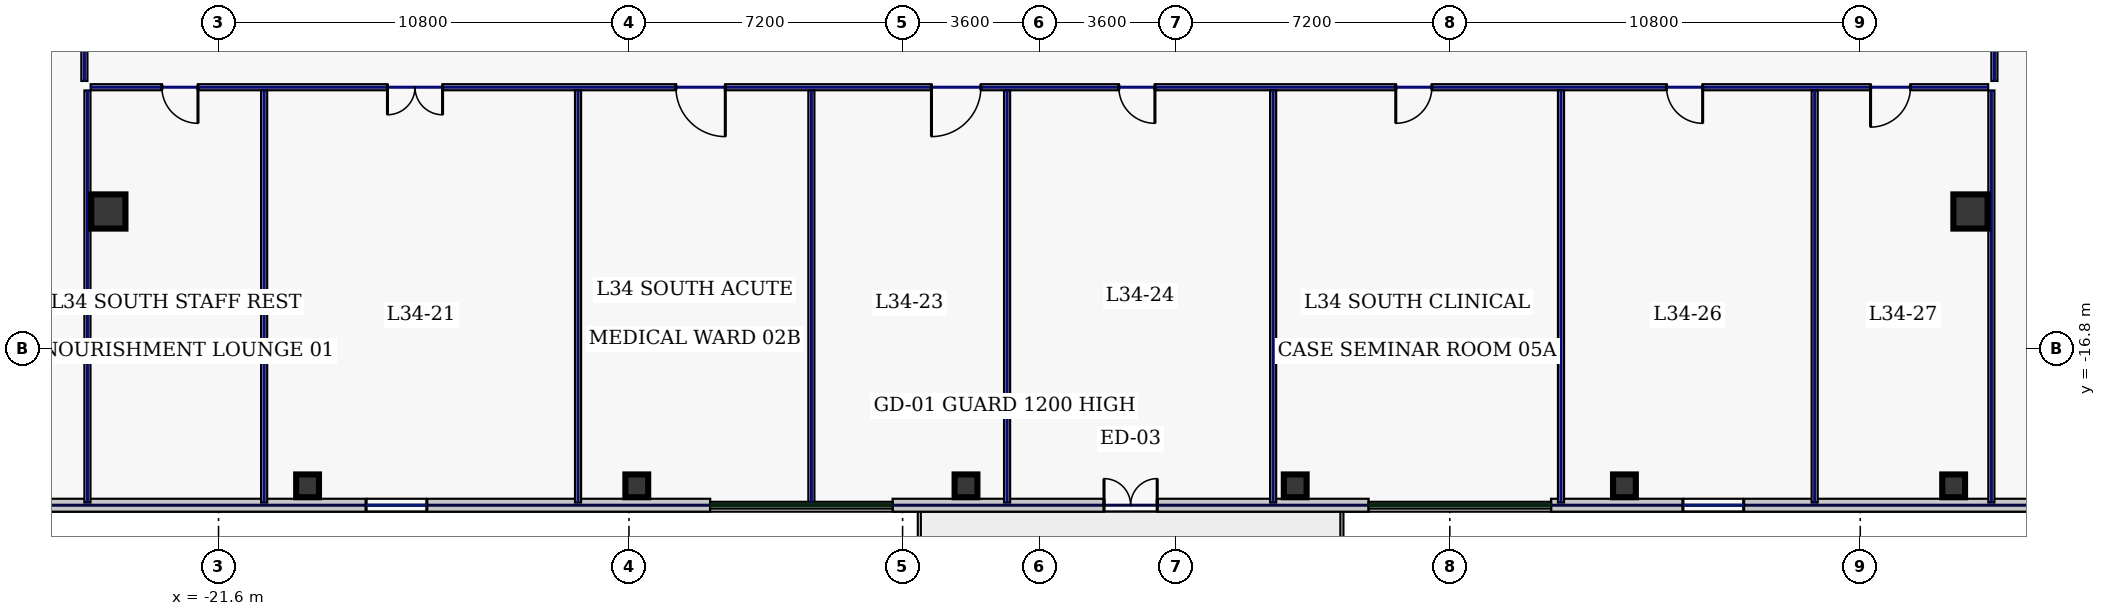
"""IFC4 building model, lengths in metres.
Left out: names, types, materials, properties, quantities, classifications, styles, units other than length and angle.
Written with IfcOpenShell. Run it as: python <this file> out.ifc"""

import sys

from ifc_helpers import new_model, si_unit, direction, frame, frame_2d, origin, origin_2d, place, context, subcontext, project, spatial, rectangle, hollow_rectangle, extrude, element, fill, save


model = new_model("IFC4")
c1 = context("Model", 3, precision=1e-05, world=origin(), true_north=direction((0.0, 1.0)))
c2 = subcontext(c1, "Body", "Model", "MODEL_VIEW")
j1 = project(units=[si_unit("LENGTHUNIT", "METRE"), si_unit("PLANEANGLEUNIT", "RADIAN")], contexts=[c1])
p1 = place(None, origin())
s1 = spatial("IfcSite", under=j1, at=p1, CompositionType="ELEMENT")
p2 = place(p1, origin())
s2 = spatial("IfcBuilding", under=s1, at=p2, CompositionType="ELEMENT")
p3 = place(p2, frame((0.0, 0.0, 152.2)))
s3 = spatial("IfcBuildingStorey", under=s2, at=p3, CompositionType="ELEMENT", Elevation=152.2)
for number, where, z_axis, x_axis in (
    (1, (-24.5, -13.2, 0.0), (0.0, 0.0, 1.0), (1.0, 0.0, 0.0)),
    (2, (24.5, -13.2, 0.0), (0.0, 0.0, 1.0), (1.0, 0.0, 0.0)),
):
    element("IfcColumn", number, at=place(p3, frame(where, z_axis=z_axis, x_axis=x_axis)), inside=s3, PredefinedType="COLUMN", context=c2, shape_type="SweptSolid", body=[
        extrude(hollow_rectangle(XDim=0.9, YDim=0.9, WallThickness=0.04, at=origin_2d()), origin(), (0.0, 0.0, 1.0), 3.74),
    ])
for number, where, z_axis, x_axis in (
    (3, (-19.257, -20.42, 0.0), (0.0, 0.0, 1.0), (1.0, 0.0, 0.0)),
    (4, (-10.594, -20.42, 0.0), (0.0, 0.0, 1.0), (1.0, 0.0, 0.0)),
    (5, (-1.931, -20.42, 0.0), (0.0, 0.0, 1.0), (1.0, 0.0, 0.0)),
    (6, (6.731, -20.42, 0.0), (0.0, 0.0, 1.0), (1.0, 0.0, 0.0)),
    (7, (15.394, -20.42, 0.0), (0.0, 0.0, 1.0), (1.0, 0.0, 0.0)),
    (8, (24.057, -20.42, 0.0), (0.0, 0.0, 1.0), (1.0, 0.0, 0.0)),
):
    element("IfcColumn", number, at=place(p3, frame(where, z_axis=z_axis, x_axis=x_axis)), inside=s3, PredefinedType="COLUMN", context=c2, shape_type="SweptSolid", body=[
        extrude(hollow_rectangle(XDim=0.6, YDim=0.6, WallThickness=0.028, at=origin_2d()), origin(), (0.0, 0.0, 1.0), 3.74),
    ])
p4 = place(p3, frame((-28.6, -20.93, 0.0), z_axis=(0.0, 0.0, 1.0), x_axis=(1.0, 0.0, 0.0)))
e9 = element("IfcWall", 9, at=p4, inside=s3, PredefinedType="STANDARD", context=c2, shape_type="SweptSolid", body=[
    extrude(rectangle(XDim=19.937, YDim=0.34, at=frame_2d((9.969, 0.0))), origin(), (0.0, 0.0, 1.0), 3.74),
])
p5 = place(p4, frame((10.882, 0.0, 0.22)))
e10 = element("IfcOpeningElement", 10, at=p5, cuts=e9, PredefinedType="OPENING", context=c2, shape_type="SweptSolid", body=[
    extrude(rectangle(XDim=1.6, YDim=1.2, at=frame_2d((0.8, 0.6))), frame((0.0, 0.18, 0.0), z_axis=(0.0, -1.0, 0.0), x_axis=(1.0, 0.0, 0.0)), (0.0, 0.0, 1.0), 0.36),
])
p6 = place(p3, frame((-3.863, -20.93, 0.0), z_axis=(0.0, 0.0, 1.0), x_axis=(1.0, 0.0, 0.0)))
e11 = element("IfcWall", 11, at=p6, inside=s3, PredefinedType="STANDARD", context=c2, shape_type="SweptSolid", body=[
    extrude(rectangle(XDim=12.526, YDim=0.34, at=frame_2d((6.263, 0.0))), origin(), (0.0, 0.0, 1.0), 3.74),
])
p7 = place(p6, frame((5.563, 0.0, 0.0)))
e12 = element("IfcOpeningElement", 12, at=p7, cuts=e11, PredefinedType="OPENING", context=c2, shape_type="SweptSolid", body=[
    extrude(rectangle(XDim=1.4, YDim=2.2, at=frame_2d((0.7, 1.1))), frame((0.0, 0.18, 0.0), z_axis=(0.0, -1.0, 0.0), x_axis=(1.0, 0.0, 0.0)), (0.0, 0.0, 1.0), 0.36),
])
p8 = place(p3, frame((13.463, -20.93, 0.0), z_axis=(0.0, 0.0, 1.0), x_axis=(1.0, 0.0, 0.0)))
e13 = element("IfcWall", 13, at=p8, inside=s3, PredefinedType="STANDARD", context=c2, shape_type="SweptSolid", body=[
    extrude(rectangle(XDim=19.937, YDim=0.34, at=frame_2d((9.969, 0.0))), origin(), (0.0, 0.0, 1.0), 3.74),
])
p9 = place(p8, frame((3.47, 0.0, 0.22)))
e14 = element("IfcOpeningElement", 14, at=p9, cuts=e13, PredefinedType="OPENING", context=c2, shape_type="SweptSolid", body=[
    extrude(rectangle(XDim=1.6, YDim=1.2, at=frame_2d((0.8, 0.6))), frame((0.0, 0.18, 0.0), z_axis=(0.0, -1.0, 0.0), x_axis=(1.0, 0.0, 0.0)), (0.0, 0.0, 1.0), 0.36),
])
p10 = place(p8, frame((16.118, 0.0, 0.22)))
e15 = element("IfcOpeningElement", 15, at=p10, cuts=e13, PredefinedType="OPENING", context=c2, shape_type="SweptSolid", body=[
    extrude(rectangle(XDim=1.6, YDim=1.2, at=frame_2d((0.8, 0.6))), frame((0.0, 0.18, 0.0), z_axis=(0.0, -1.0, 0.0), x_axis=(1.0, 0.0, 0.0)), (0.0, 0.0, 1.0), 0.36),
])
p11 = place(p3, frame((-25.13, -9.765, 0.0), z_axis=(0.0, 0.0, 1.0), x_axis=(0.0, 1.0, 0.0)))
e16 = element("IfcWall", 16, at=p11, inside=s3, PredefinedType="PARTITIONING", context=c2, shape_type="SweptSolid", body=[
    extrude(rectangle(XDim=2.98, YDim=0.16, at=frame_2d((1.49, 0.0))), origin(), (0.0, 0.0, 1.0), 3.74),
])
p12 = place(p11, frame((1.1, 0.0, 0.0)))
e17 = element("IfcOpeningElement", 17, at=p12, cuts=e16, PredefinedType="OPENING", context=c2, shape_type="SweptSolid", body=[
    extrude(rectangle(XDim=0.95, YDim=2.2, at=frame_2d((0.475, 1.1))), frame((0.0, 0.09, 0.0), z_axis=(0.0, -1.0, 0.0), x_axis=(1.0, 0.0, 0.0)), (0.0, 0.0, 1.0), 0.18),
])
p13 = place(p3, frame((25.13, -6.785, 0.0), z_axis=(0.0, 0.0, 1.0), x_axis=(0.0, -1.0, 0.0)))
e18 = element("IfcWall", 18, at=p13, inside=s3, PredefinedType="PARTITIONING", context=c2, shape_type="SweptSolid", body=[
    extrude(rectangle(XDim=2.98, YDim=0.16, at=frame_2d((1.49, 0.0))), origin(), (0.0, 0.0, 1.0), 3.74),
])
p14 = place(p13, frame((1.1, 0.0, 0.0)))
e19 = element("IfcOpeningElement", 19, at=p14, cuts=e18, PredefinedType="OPENING", context=c2, shape_type="SweptSolid", body=[
    extrude(rectangle(XDim=0.95, YDim=2.2, at=frame_2d((0.475, 1.1))), frame((0.0, 0.09, 0.0), z_axis=(0.0, -1.0, 0.0), x_axis=(1.0, 0.0, 0.0)), (0.0, 0.0, 1.0), 0.18),
])
p15 = place(p3, frame((24.965, -9.93, 0.0), z_axis=(0.0, 0.0, 1.0), x_axis=(-1.0, 0.0, 0.0)))
e20 = element("IfcWall", 20, at=p15, inside=s3, PredefinedType="PARTITIONING", context=c2, shape_type="SweptSolid", body=[
    extrude(rectangle(XDim=49.93, YDim=0.16, at=frame_2d((24.965, 0.0))), origin(), (0.0, 0.0, 1.0), 3.74),
])
p16 = place(p15, frame((47.106, 0.0, 0.0)))
e21 = element("IfcOpeningElement", 21, at=p16, cuts=e20, PredefinedType="OPENING", context=c2, shape_type="SweptSolid", body=[
    extrude(rectangle(XDim=0.95, YDim=2.2, at=frame_2d((0.475, 1.1))), frame((0.0, 0.09, 0.0), z_axis=(0.0, -1.0, 0.0), x_axis=(1.0, 0.0, 0.0)), (0.0, 0.0, 1.0), 0.18),
])
p17 = place(p15, frame((40.67, 0.0, 0.0)))
e22 = element("IfcOpeningElement", 22, at=p17, cuts=e20, PredefinedType="OPENING", context=c2, shape_type="SweptSolid", body=[
    extrude(rectangle(XDim=1.45, YDim=2.2, at=frame_2d((0.725, 1.1))), frame((0.0, 0.09, 0.0), z_axis=(0.0, -1.0, 0.0), x_axis=(1.0, 0.0, 0.0)), (0.0, 0.0, 1.0), 0.18),
])
p18 = place(p15, frame((33.23, 0.0, 0.0)))
e23 = element("IfcOpeningElement", 23, at=p18, cuts=e20, PredefinedType="OPENING", context=c2, shape_type="SweptSolid", body=[
    extrude(rectangle(XDim=1.3, YDim=2.2, at=frame_2d((0.65, 1.1))), frame((0.0, 0.09, 0.0), z_axis=(0.0, -1.0, 0.0), x_axis=(1.0, 0.0, 0.0)), (0.0, 0.0, 1.0), 0.18),
])
p19 = place(p15, frame((26.505, 0.0, 0.0)))
e24 = element("IfcOpeningElement", 24, at=p19, cuts=e20, PredefinedType="OPENING", context=c2, shape_type="SweptSolid", body=[
    extrude(rectangle(XDim=1.3, YDim=2.2, at=frame_2d((0.65, 1.1))), frame((0.0, 0.09, 0.0), z_axis=(0.0, -1.0, 0.0), x_axis=(1.0, 0.0, 0.0)), (0.0, 0.0, 1.0), 0.18),
])
p20 = place(p15, frame((21.925, 0.0, 0.0)))
e25 = element("IfcOpeningElement", 25, at=p20, cuts=e20, PredefinedType="OPENING", context=c2, shape_type="SweptSolid", body=[
    extrude(rectangle(XDim=0.95, YDim=2.2, at=frame_2d((0.475, 1.1))), frame((0.0, 0.09, 0.0), z_axis=(0.0, -1.0, 0.0), x_axis=(1.0, 0.0, 0.0)), (0.0, 0.0, 1.0), 0.18),
])
p21 = place(p15, frame((14.637, 0.0, 0.0)))
e26 = element("IfcOpeningElement", 26, at=p21, cuts=e20, PredefinedType="OPENING", context=c2, shape_type="SweptSolid", body=[
    extrude(rectangle(XDim=0.95, YDim=2.2, at=frame_2d((0.475, 1.1))), frame((0.0, 0.09, 0.0), z_axis=(0.0, -1.0, 0.0), x_axis=(1.0, 0.0, 0.0)), (0.0, 0.0, 1.0), 0.18),
])
p22 = place(p15, frame((7.512, 0.0, 0.0)))
e27 = element("IfcOpeningElement", 27, at=p22, cuts=e20, PredefinedType="OPENING", context=c2, shape_type="SweptSolid", body=[
    extrude(rectangle(XDim=0.95, YDim=2.2, at=frame_2d((0.475, 1.1))), frame((0.0, 0.09, 0.0), z_axis=(0.0, -1.0, 0.0), x_axis=(1.0, 0.0, 0.0)), (0.0, 0.0, 1.0), 0.18),
])
p23 = place(p15, frame((2.044, 0.0, 0.0)))
e28 = element("IfcOpeningElement", 28, at=p23, cuts=e20, PredefinedType="OPENING", context=c2, shape_type="SweptSolid", body=[
    extrude(rectangle(XDim=1.05, YDim=2.2, at=frame_2d((0.525, 1.1))), frame((0.0, 0.09, 0.0), z_axis=(0.0, -1.0, 0.0), x_axis=(1.0, 0.0, 0.0)), (0.0, 0.0, 1.0), 0.18),
])
for number, where, z_axis, x_axis in (
    (29, (-25.05, -20.86, 0.0), (0.0, 0.0, 1.0), (0.0, 1.0, 0.0)),
    (30, (25.05, -20.86, 0.0), (0.0, 0.0, 1.0), (0.0, 1.0, 0.0)),
    (31, (-20.4, -20.86, 0.0), (0.0, 0.0, 1.0), (0.0, 1.0, 0.0)),
    (32, (-6.0, -20.86, 0.0), (0.0, 0.0, 1.0), (0.0, 1.0, 0.0)),
    (33, (-0.85, -20.86, 0.0), (0.0, 0.0, 1.0), (0.0, 1.0, 0.0)),
):
    element("IfcWall", number, at=place(p3, frame(where, z_axis=z_axis, x_axis=x_axis)), inside=s3, PredefinedType="PARTITIONING", context=c2, shape_type="SweptSolid", body=[
        extrude(rectangle(XDim=10.845, YDim=0.16, at=frame_2d((5.423, 0.0))), origin(), (0.0, 0.0, 1.0), 3.74),
    ])
p24 = place(p3, frame((6.15, -20.86, 0.0), z_axis=(0.0, 0.0, 1.0), x_axis=(0.0, 1.0, 0.0)))
e34 = element("IfcWall", 34, at=p24, inside=s3, PredefinedType="PARTITIONING", context=c2, shape_type="SweptSolid", body=[
    extrude(rectangle(XDim=10.845, YDim=0.16, at=frame_2d((5.423, 0.0))), origin(), (0.0, 0.0, 1.0), 2.135),
])
p25 = place(p3, frame((20.4, -20.86, 0.0), z_axis=(0.0, 0.0, 1.0), x_axis=(0.0, 1.0, 0.0)))
e35 = element("IfcWall", 35, at=p25, inside=s3, PredefinedType="PARTITIONING", context=c2, shape_type="SweptSolid", body=[
    extrude(rectangle(XDim=10.845, YDim=0.16, at=frame_2d((5.423, 0.0))), origin(), (0.0, 0.0, 1.0), 3.74),
])
p26 = place(p3, frame((-12.14, -20.86, 0.0), z_axis=(0.0, 0.0, 1.0), x_axis=(0.0, 1.0, 0.0)))
e36 = element("IfcWall", 36, at=p26, inside=s3, PredefinedType="PARTITIONING", context=c2, shape_type="SweptSolid", body=[
    extrude(rectangle(XDim=10.845, YDim=0.16, at=frame_2d((5.423, 0.0))), origin(), (0.0, 0.0, 1.0), 1.535),
])
p27 = place(p3, frame((13.725, -20.86, 0.0), z_axis=(0.0, 0.0, 1.0), x_axis=(0.0, 1.0, 0.0)))
e37 = element("IfcWall", 37, at=p27, inside=s3, PredefinedType="PARTITIONING", context=c2, shape_type="SweptSolid", body=[
    extrude(rectangle(XDim=10.845, YDim=0.16, at=frame_2d((5.423, 0.0))), origin(), (0.0, 0.0, 1.0), 3.74),
])
p28 = place(p5, origin())
e38 = element("IfcWindow", 38, at=p28, inside=s3, PartitioningType="SINGLE_PANEL", PredefinedType="WINDOW", context=c2, shape_type="SweptSolid", body=[
    extrude(rectangle(XDim=1.6, YDim=1.2, at=frame_2d((0.8, 0.6))), frame((0.0, 0.03, 0.0), z_axis=(0.0, -1.0, 0.0), x_axis=(1.0, 0.0, 0.0)), (0.0, 0.0, 1.0), 0.06),
])
fill(e10, e38)
p29 = place(p7, origin())
e39 = element("IfcDoor", 39, at=p29, inside=s3, OperationType="DOUBLE_SWING_LEFT", PredefinedType="DOOR", context=c2, shape_type="SweptSolid", body=[
    extrude(rectangle(XDim=1.4, YDim=2.2, at=frame_2d((0.7, 1.1))), frame((0.0, 0.025, 0.0), z_axis=(0.0, -1.0, 0.0), x_axis=(1.0, 0.0, 0.0)), (0.0, 0.0, 1.0), 0.05),
])
fill(e12, e39)
p30 = place(p9, origin())
e40 = element("IfcWindow", 40, at=p30, inside=s3, PartitioningType="SINGLE_PANEL", PredefinedType="WINDOW", context=c2, shape_type="SweptSolid", body=[
    extrude(rectangle(XDim=1.6, YDim=1.2, at=frame_2d((0.8, 0.6))), frame((0.0, 0.03, 0.0), z_axis=(0.0, -1.0, 0.0), x_axis=(1.0, 0.0, 0.0)), (0.0, 0.0, 1.0), 0.06),
])
fill(e14, e40)
p31 = place(p16, origin())
e41 = element("IfcDoor", 41, at=p31, inside=s3, OperationType="SINGLE_SWING_LEFT", PredefinedType="DOOR", context=c2, shape_type="SweptSolid", body=[
    extrude(rectangle(XDim=0.95, YDim=2.2, at=frame_2d((0.475, 1.1))), frame((0.0, 0.025, 0.0), z_axis=(0.0, -1.0, 0.0), x_axis=(1.0, 0.0, 0.0)), (0.0, 0.0, 1.0), 0.05),
])
fill(e21, e41)
p32 = place(p17, origin())
e42 = element("IfcDoor", 42, at=p32, inside=s3, OperationType="DOUBLE_SWING_LEFT", PredefinedType="DOOR", context=c2, shape_type="SweptSolid", body=[
    extrude(rectangle(XDim=1.45, YDim=2.2, at=frame_2d((0.725, 1.1))), frame((0.0, 0.025, 0.0), z_axis=(0.0, -1.0, 0.0), x_axis=(1.0, 0.0, 0.0)), (0.0, 0.0, 1.0), 0.05),
])
fill(e22, e42)
p33 = place(p18, origin())
e43 = element("IfcDoor", 43, at=p33, inside=s3, OperationType="SINGLE_SWING_LEFT", PredefinedType="DOOR", context=c2, shape_type="SweptSolid", body=[
    extrude(rectangle(XDim=1.3, YDim=2.2, at=frame_2d((0.65, 1.1))), frame((0.0, 0.025, 0.0), z_axis=(0.0, -1.0, 0.0), x_axis=(1.0, 0.0, 0.0)), (0.0, 0.0, 1.0), 0.05),
])
fill(e23, e43)
p34 = place(p19, origin())
e44 = element("IfcDoor", 44, at=p34, inside=s3, OperationType="SINGLE_SWING_RIGHT", PredefinedType="DOOR", context=c2, shape_type="SweptSolid", body=[
    extrude(rectangle(XDim=1.3, YDim=2.2, at=frame_2d((0.65, 1.1))), frame((0.0, 0.025, 0.0), z_axis=(0.0, -1.0, 0.0), x_axis=(1.0, 0.0, 0.0)), (0.0, 0.0, 1.0), 0.05),
])
fill(e24, e44)
p35 = place(p20, origin())
e45 = element("IfcDoor", 45, at=p35, inside=s3, OperationType="SINGLE_SWING_LEFT", PredefinedType="DOOR", context=c2, shape_type="SweptSolid", body=[
    extrude(rectangle(XDim=0.95, YDim=2.2, at=frame_2d((0.475, 1.1))), frame((0.0, 0.025, 0.0), z_axis=(0.0, -1.0, 0.0), x_axis=(1.0, 0.0, 0.0)), (0.0, 0.0, 1.0), 0.05),
])
fill(e25, e45)
p36 = place(p21, origin())
e46 = element("IfcDoor", 46, at=p36, inside=s3, OperationType="SINGLE_SWING_RIGHT", PredefinedType="DOOR", context=c2, shape_type="SweptSolid", body=[
    extrude(rectangle(XDim=0.95, YDim=2.2, at=frame_2d((0.475, 1.1))), frame((0.0, 0.025, 0.0), z_axis=(0.0, -1.0, 0.0), x_axis=(1.0, 0.0, 0.0)), (0.0, 0.0, 1.0), 0.05),
])
fill(e26, e46)
p37 = place(p22, origin())
e47 = element("IfcDoor", 47, at=p37, inside=s3, OperationType="SINGLE_SWING_LEFT", PredefinedType="DOOR", context=c2, shape_type="SweptSolid", body=[
    extrude(rectangle(XDim=0.95, YDim=2.2, at=frame_2d((0.475, 1.1))), frame((0.0, 0.025, 0.0), z_axis=(0.0, -1.0, 0.0), x_axis=(1.0, 0.0, 0.0)), (0.0, 0.0, 1.0), 0.05),
])
fill(e27, e47)
p38 = place(p23, origin())
e48 = element("IfcDoor", 48, at=p38, inside=s3, OperationType="SINGLE_SWING_RIGHT", PredefinedType="DOOR", context=c2, shape_type="SweptSolid", body=[
    extrude(rectangle(XDim=1.05, YDim=2.2, at=frame_2d((0.525, 1.1))), frame((0.0, 0.025, 0.0), z_axis=(0.0, -1.0, 0.0), x_axis=(1.0, 0.0, 0.0)), (0.0, 0.0, 1.0), 0.05),
])
fill(e28, e48)
save(model, sys.argv[1])
